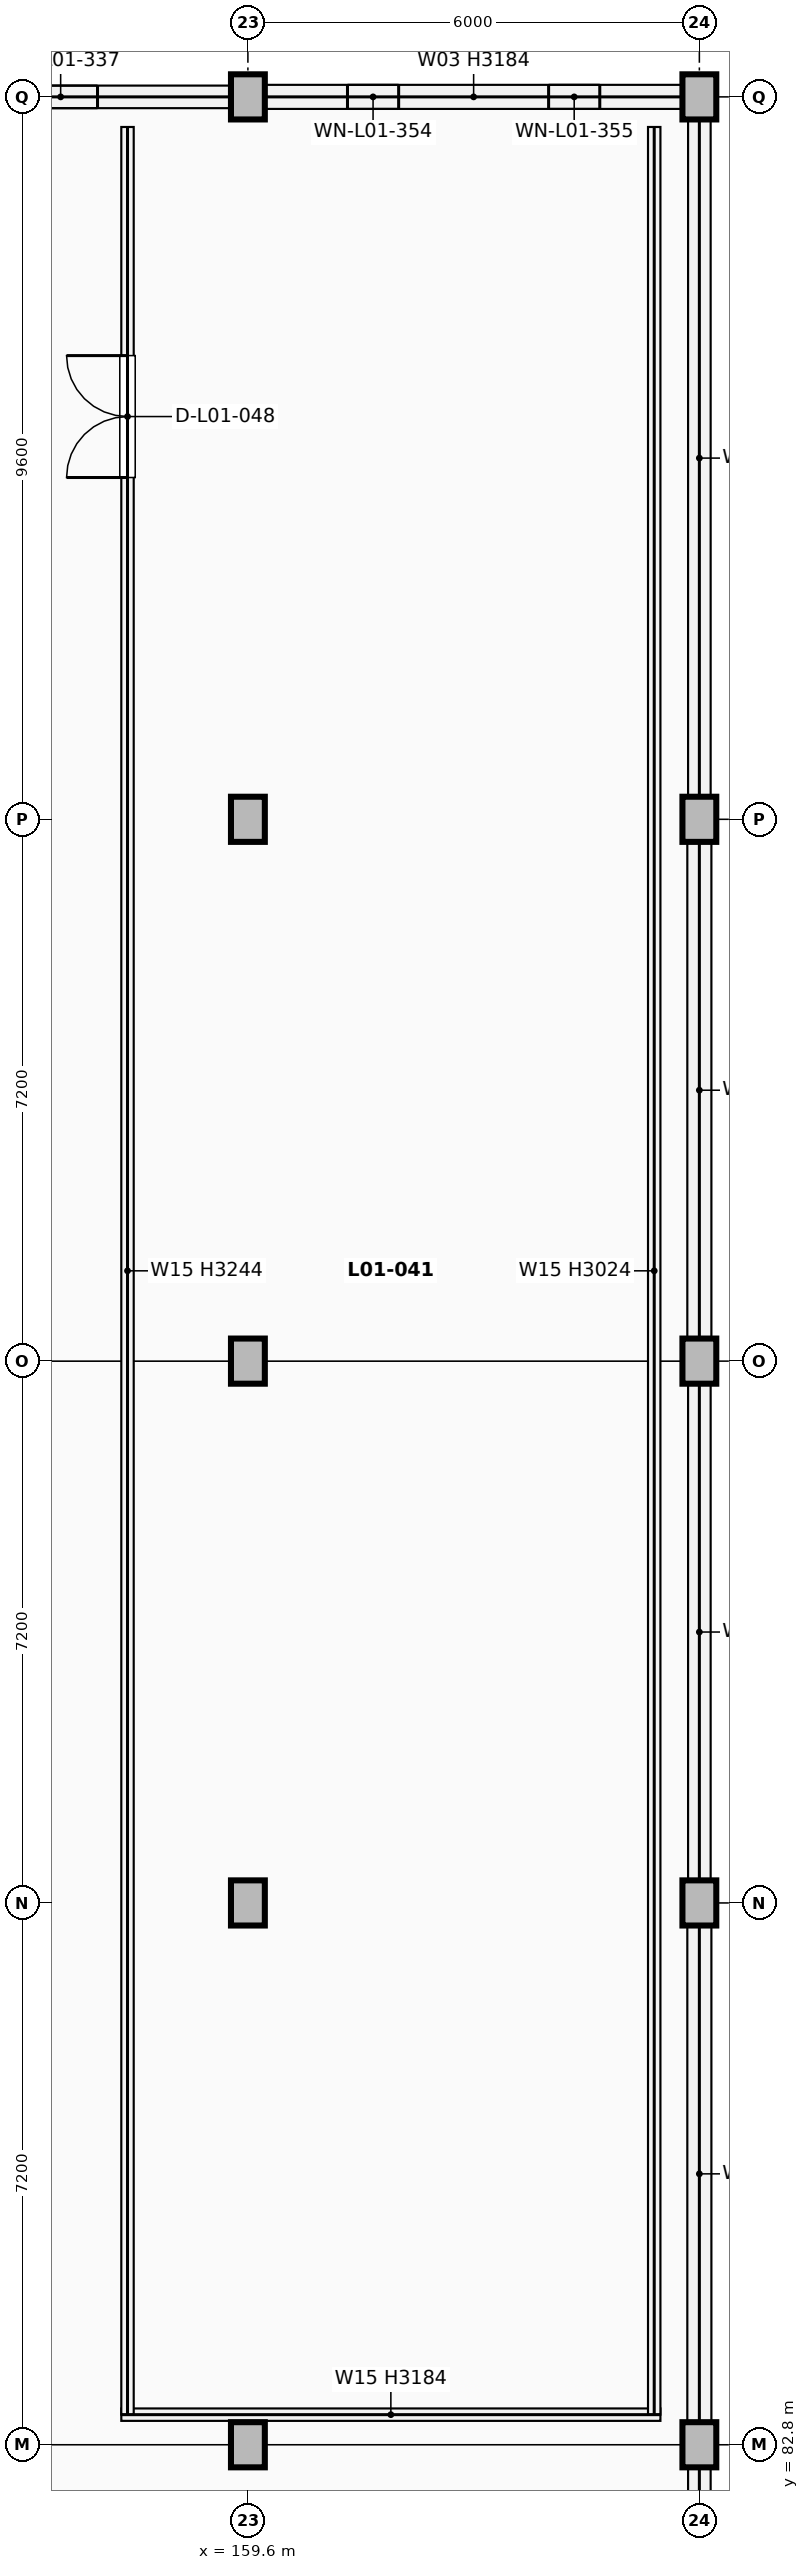
"""IFC4 building model, lengths in metres.
Left out: names, types, materials, properties, quantities, classifications, styles, units other than length and angle.
Written with IfcOpenShell. Run it as: python <this file> out.ifc"""

import sys

from ifc_helpers import new_model, si_unit, direction, frame, frame_2d, origin, origin_2d, place, context, subcontext, project, spatial, rectangle, extrude, element, fill, save


model = new_model("IFC4")
c1 = context("Model", 3, precision=1e-05, world=origin(), true_north=direction((0.0, 1.0)))
c2 = subcontext(c1, "Body", "Model", "MODEL_VIEW")
j1 = project(units=[si_unit("LENGTHUNIT", "METRE"), si_unit("PLANEANGLEUNIT", "RADIAN")], contexts=[c1])
p1 = place(None, origin())
s1 = spatial("IfcSite", under=j1, at=p1, CompositionType="ELEMENT")
p2 = place(p1, origin())
s2 = spatial("IfcBuilding", under=s1, at=p2, CompositionType="ELEMENT")
p3 = place(p2, frame((0.0, 0.0, 5.1)))
s3 = spatial("IfcBuildingStorey", under=s2, at=p3, CompositionType="ELEMENT", Elevation=5.1)
for number, where, z_axis, x_axis in (
    (1, (159.6, 82.8, 0.0), (0.0, 0.0, 1.0), (1.0, 0.0, 0.0)),
    (2, (159.6, 90.0, 0.0), (0.0, 0.0, 1.0), (1.0, 0.0, 0.0)),
    (3, (159.6, 97.2, 0.0), (0.0, 0.0, 1.0), (1.0, 0.0, 0.0)),
    (4, (159.6, 104.4, 0.0), (0.0, 0.0, 1.0), (1.0, 0.0, 0.0)),
    (5, (159.6, 114.0, 0.0), (0.0, 0.0, 1.0), (1.0, 0.0, 0.0)),
    (6, (165.6, 82.8, 0.0), (0.0, 0.0, 1.0), (1.0, 0.0, 0.0)),
    (7, (165.6, 90.0, 0.0), (0.0, 0.0, 1.0), (1.0, 0.0, 0.0)),
    (8, (165.6, 97.2, 0.0), (0.0, 0.0, 1.0), (1.0, 0.0, 0.0)),
    (9, (165.6, 104.4, 0.0), (0.0, 0.0, 1.0), (1.0, 0.0, 0.0)),
    (10, (165.6, 114.0, 0.0), (0.0, 0.0, 1.0), (1.0, 0.0, 0.0)),
):
    element("IfcColumn", number, at=place(p3, frame(where, z_axis=z_axis, x_axis=x_axis)), inside=s3, PredefinedType="COLUMN", context=c2, shape_type="SweptSolid", body=[
        extrude(rectangle(XDim=0.45, YDim=0.6, at=origin_2d()), origin(), (0.0, 0.0, 1.0), 4.42),
    ])
p4 = place(p3, frame((150.227, 114.0, 0.0), z_axis=(0.0, 0.0, 1.0), x_axis=(1.0, 0.0, 0.0)))
e11 = element("IfcWall", 11, at=p4, inside=s3, PredefinedType="SOLIDWALL", context=c2, shape_type="SweptSolid", body=[
    extrude(rectangle(XDim=9.146, YDim=0.3, at=frame_2d((4.573, 0.0))), origin(), (0.0, 0.0, 1.0), 3.184),
])
p5 = place(p4, frame((1.771, 0.0, 0.75)))
e12 = element("IfcOpeningElement", 12, at=p5, cuts=e11, PredefinedType="OPENING", context=c2, shape_type="SweptSolid", body=[
    extrude(rectangle(XDim=0.98, YDim=2.28, at=frame_2d((0.49, 1.14))), frame((0.0, 0.16, 0.0), z_axis=(0.0, -1.0, 0.0), x_axis=(1.0, 0.0, 0.0)), (0.0, 0.0, 1.0), 0.32),
])
p6 = place(p4, frame((4.083, 0.0, 0.75)))
e13 = element("IfcOpeningElement", 13, at=p6, cuts=e11, PredefinedType="OPENING", context=c2, shape_type="SweptSolid", body=[
    extrude(rectangle(XDim=0.98, YDim=2.28, at=frame_2d((0.49, 1.14))), frame((0.0, 0.16, 0.0), z_axis=(0.0, -1.0, 0.0), x_axis=(1.0, 0.0, 0.0)), (0.0, 0.0, 1.0), 0.32),
])
p7 = place(p4, frame((6.395, 0.0, 0.75)))
e14 = element("IfcOpeningElement", 14, at=p7, cuts=e11, PredefinedType="OPENING", context=c2, shape_type="SweptSolid", body=[
    extrude(rectangle(XDim=0.98, YDim=2.28, at=frame_2d((0.49, 1.14))), frame((0.0, 0.16, 0.0), z_axis=(0.0, -1.0, 0.0), x_axis=(1.0, 0.0, 0.0)), (0.0, 0.0, 1.0), 0.32),
])
p8 = place(p3, frame((159.827, 114.0, 0.0), z_axis=(0.0, 0.0, 1.0), x_axis=(1.0, 0.0, 0.0)))
e15 = element("IfcWall", 15, at=p8, inside=s3, PredefinedType="SOLIDWALL", context=c2, shape_type="SweptSolid", body=[
    extrude(rectangle(XDim=5.546, YDim=0.32, at=frame_2d((2.773, 0.0))), origin(), (0.0, 0.0, 1.0), 3.184),
])
p9 = place(p8, frame((1.096, 0.0, 0.75)))
e16 = element("IfcOpeningElement", 16, at=p9, cuts=e15, PredefinedType="OPENING", context=c2, shape_type="SweptSolid", body=[
    extrude(rectangle(XDim=0.68, YDim=2.16, at=frame_2d((0.34, 1.08))), frame((0.0, 0.17, 0.0), z_axis=(0.0, -1.0, 0.0), x_axis=(1.0, 0.0, 0.0)), (0.0, 0.0, 1.0), 0.34),
])
p10 = place(p8, frame((3.77, 0.0, 0.75)))
e17 = element("IfcOpeningElement", 17, at=p10, cuts=e15, PredefinedType="OPENING", context=c2, shape_type="SweptSolid", body=[
    extrude(rectangle(XDim=0.68, YDim=2.16, at=frame_2d((0.34, 1.08))), frame((0.0, 0.17, 0.0), z_axis=(0.0, -1.0, 0.0), x_axis=(1.0, 0.0, 0.0)), (0.0, 0.0, 1.0), 0.34),
])
p11 = place(p3, frame((165.6, 79.502, 0.0), z_axis=(0.0, 0.0, 1.0), x_axis=(0.0, 1.0, 0.0)))
e18 = element("IfcWall", 18, at=p11, inside=s3, PredefinedType="SOLIDWALL", context=c2, shape_type="SweptSolid", body=[
    extrude(rectangle(XDim=2.996, YDim=0.3, at=frame_2d((1.498, 0.0))), origin(), (0.0, 0.0, 1.0), 3.024),
])
p12 = place(p3, frame((165.6, 83.102, 0.0), z_axis=(0.0, 0.0, 1.0), x_axis=(0.0, 1.0, 0.0)))
e19 = element("IfcWall", 19, at=p12, inside=s3, PredefinedType="SOLIDWALL", context=c2, shape_type="SweptSolid", body=[
    extrude(rectangle(XDim=6.596, YDim=0.32, at=frame_2d((3.298, 0.0))), origin(), (0.0, 0.0, 1.0), 3.024),
])
p13 = place(p3, frame((165.6, 90.302, 0.0), z_axis=(0.0, 0.0, 1.0), x_axis=(0.0, 1.0, 0.0)))
e20 = element("IfcWall", 20, at=p13, inside=s3, PredefinedType="SOLIDWALL", context=c2, shape_type="SweptSolid", body=[
    extrude(rectangle(XDim=6.596, YDim=0.3, at=frame_2d((3.298, 0.0))), origin(), (0.0, 0.0, 1.0), 3.024),
])
p14 = place(p3, frame((165.6, 97.502, 0.0), z_axis=(0.0, 0.0, 1.0), x_axis=(0.0, 1.0, 0.0)))
e21 = element("IfcWall", 21, at=p14, inside=s3, PredefinedType="SOLIDWALL", context=c2, shape_type="SweptSolid", body=[
    extrude(rectangle(XDim=6.596, YDim=0.32, at=frame_2d((3.298, 0.0))), origin(), (0.0, 0.0, 1.0), 3.024),
])
p15 = place(p3, frame((165.6, 104.702, 0.0), z_axis=(0.0, 0.0, 1.0), x_axis=(0.0, 1.0, 0.0)))
e22 = element("IfcWall", 22, at=p15, inside=s3, PredefinedType="SOLIDWALL", context=c2, shape_type="SweptSolid", body=[
    extrude(rectangle(XDim=8.996, YDim=0.3, at=frame_2d((4.498, 0.0))), origin(), (0.0, 0.0, 1.0), 3.024),
])
p16 = place(p3, frame((157.917, 83.2, 0.0), z_axis=(0.0, 0.0, 1.0), x_axis=(1.0, 0.0, 0.0)))
e23 = element("IfcWall", 23, at=p16, inside=s3, PredefinedType="PARTITIONING", context=c2, shape_type="SweptSolid", body=[
    extrude(rectangle(XDim=7.165, YDim=0.165, at=frame_2d((3.583, 0.0))), origin(), (0.0, 0.0, 1.0), 3.184),
])
p17 = place(p3, frame((158.0, 83.2, 0.0), z_axis=(0.0, 0.0, 1.0), x_axis=(0.0, 1.0, 0.0)))
e24 = element("IfcWall", 24, at=p17, inside=s3, PredefinedType="PARTITIONING", context=c2, shape_type="SweptSolid", body=[
    extrude(rectangle(XDim=30.4, YDim=0.165, at=frame_2d((15.2, 0.0))), origin(), (0.0, 0.0, 1.0), 3.244),
])
p18 = place(p17, frame((25.742, 0.0, 0.0)))
e25 = element("IfcOpeningElement", 25, at=p18, cuts=e24, PredefinedType="OPENING", context=c2, shape_type="SweptSolid", body=[
    extrude(rectangle(XDim=1.62, YDim=2.32, at=frame_2d((0.81, 1.16))), frame((0.0, 0.093, 0.0), z_axis=(0.0, -1.0, 0.0), x_axis=(1.0, 0.0, 0.0)), (0.0, 0.0, 1.0), 0.185),
])
p19 = place(p3, frame((165.0, 83.2, 0.0), z_axis=(0.0, 0.0, 1.0), x_axis=(0.0, 1.0, 0.0)))
e26 = element("IfcWall", 26, at=p19, inside=s3, PredefinedType="PARTITIONING", context=c2, shape_type="SweptSolid", body=[
    extrude(rectangle(XDim=30.4, YDim=0.165, at=frame_2d((15.2, 0.0))), origin(), (0.0, 0.0, 1.0), 3.024),
])
p20 = place(p7, origin())
e27 = element("IfcWindow", 27, at=p20, inside=s3, PartitioningType="SINGLE_PANEL", PredefinedType="WINDOW", context=c2, shape_type="SweptSolid", body=[
    extrude(rectangle(XDim=0.98, YDim=2.28, at=frame_2d((0.49, 1.14))), frame((0.0, 0.03, 0.0), z_axis=(0.0, -1.0, 0.0), x_axis=(1.0, 0.0, 0.0)), (0.0, 0.0, 1.0), 0.06),
])
fill(e14, e27)
p21 = place(p9, origin())
e28 = element("IfcWindow", 28, at=p21, inside=s3, PartitioningType="SINGLE_PANEL", PredefinedType="WINDOW", context=c2, shape_type="SweptSolid", body=[
    extrude(rectangle(XDim=0.68, YDim=2.16, at=frame_2d((0.34, 1.08))), frame((0.0, 0.03, 0.0), z_axis=(0.0, -1.0, 0.0), x_axis=(1.0, 0.0, 0.0)), (0.0, 0.0, 1.0), 0.06),
])
fill(e16, e28)
p22 = place(p10, origin())
e29 = element("IfcWindow", 29, at=p22, inside=s3, PartitioningType="SINGLE_PANEL", PredefinedType="WINDOW", context=c2, shape_type="SweptSolid", body=[
    extrude(rectangle(XDim=0.68, YDim=2.16, at=frame_2d((0.34, 1.08))), frame((0.0, 0.03, 0.0), z_axis=(0.0, -1.0, 0.0), x_axis=(1.0, 0.0, 0.0)), (0.0, 0.0, 1.0), 0.06),
])
fill(e17, e29)
p23 = place(p18, origin())
e30 = element("IfcDoor", 30, at=p23, inside=s3, OperationType="DOUBLE_DOOR_SINGLE_SWING", PredefinedType="DOOR", context=c2, shape_type="SweptSolid", body=[
    extrude(rectangle(XDim=1.62, YDim=2.32, at=frame_2d((0.81, 1.16))), frame((0.0, 0.025, 0.0), z_axis=(0.0, -1.0, 0.0), x_axis=(1.0, 0.0, 0.0)), (0.0, 0.0, 1.0), 0.05),
])
fill(e25, e30)
save(model, sys.argv[1])
